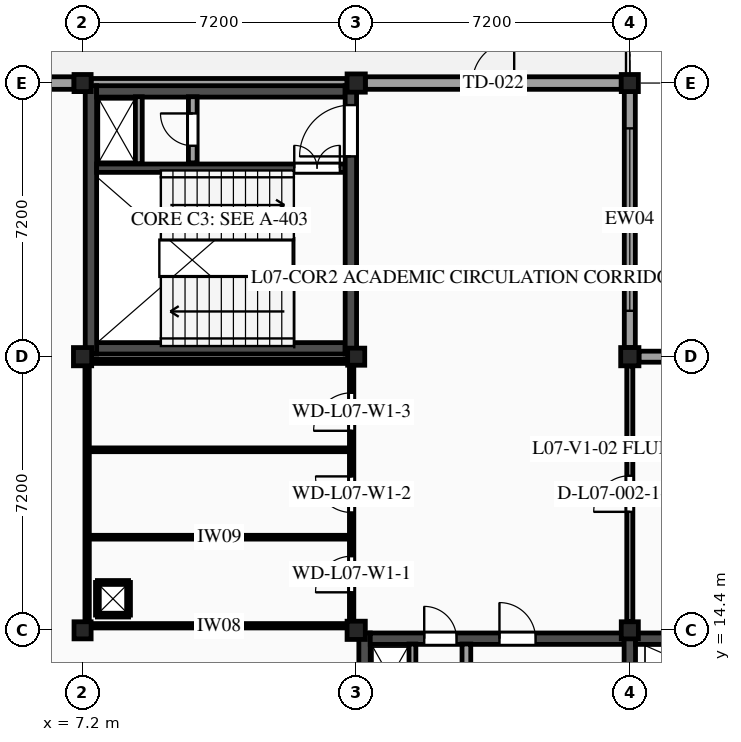
"""IFC4 building model, lengths in metres.
Left out: names, types, materials, properties, quantities, classifications, styles, units other than length and angle.
Written with IfcOpenShell. Run it as: python <this file> out.ifc"""

import sys

from ifc_helpers import new_model, si_unit, direction, frame, frame_2d, origin, origin_2d, place, context, subcontext, project, spatial, rectangle, extrude, element, fill, save


model = new_model("IFC4")
c1 = context("Model", 3, precision=1e-05, world=origin(), true_north=direction((0.0, 1.0)))
c2 = subcontext(c1, "Body", "Model", "MODEL_VIEW")
j1 = project(units=[si_unit("LENGTHUNIT", "METRE"), si_unit("PLANEANGLEUNIT", "RADIAN")], contexts=[c1])
p1 = place(None, origin())
s1 = spatial("IfcSite", under=j1, at=p1, CompositionType="ELEMENT")
p2 = place(p1, origin())
s2 = spatial("IfcBuilding", under=s1, at=p2, CompositionType="ELEMENT")
p3 = place(p2, frame((0.0, 0.0, 30.6)))
s3 = spatial("IfcBuildingStorey", under=s2, at=p3, CompositionType="ELEMENT", Elevation=30.6)
p4 = place(p3, frame((7.2, 14.4, 0.0), z_axis=(0.0, 0.0, 1.0), x_axis=(1.0, 0.0, 0.0)))
e1 = element("IfcColumn", 1, at=p4, inside=s3, PredefinedType="COLUMN", context=c2, shape_type="SweptSolid", body=[
    extrude(rectangle(XDim=0.45, YDim=0.45, at=origin_2d()), origin(), (0.0, 0.0, 1.0), 3.9),
])
p5 = place(p3, frame((7.2, 21.6, 0.0), z_axis=(0.0, 0.0, 1.0), x_axis=(1.0, 0.0, 0.0)))
e2 = element("IfcColumn", 2, at=p5, inside=s3, PredefinedType="COLUMN", context=c2, shape_type="SweptSolid", body=[
    extrude(rectangle(XDim=0.48, YDim=0.48, at=origin_2d()), origin(), (0.0, 0.0, 1.0), 3.9),
])
p6 = place(p3, frame((7.2, 28.8, 0.0), z_axis=(0.0, 0.0, 1.0), x_axis=(1.0, 0.0, 0.0)))
e3 = element("IfcColumn", 3, at=p6, inside=s3, PredefinedType="COLUMN", context=c2, shape_type="SweptSolid", body=[
    extrude(rectangle(XDim=0.45, YDim=0.45, at=origin_2d()), origin(), (0.0, 0.0, 1.0), 3.9),
])
p7 = place(p3, frame((14.4, 14.4, 0.0), z_axis=(0.0, 0.0, 1.0), x_axis=(1.0, 0.0, 0.0)))
e4 = element("IfcColumn", 4, at=p7, inside=s3, PredefinedType="COLUMN", context=c2, shape_type="SweptSolid", body=[
    extrude(rectangle(XDim=0.48, YDim=0.48, at=origin_2d()), origin(), (0.0, 0.0, 1.0), 3.9),
])
p8 = place(p3, frame((14.4, 21.6, 0.0), z_axis=(0.0, 0.0, 1.0), x_axis=(1.0, 0.0, 0.0)))
e5 = element("IfcColumn", 5, at=p8, inside=s3, PredefinedType="COLUMN", context=c2, shape_type="SweptSolid", body=[
    extrude(rectangle(XDim=0.45, YDim=0.45, at=origin_2d()), origin(), (0.0, 0.0, 1.0), 3.9),
])
p9 = place(p3, frame((14.4, 28.8, 0.0), z_axis=(0.0, 0.0, 1.0), x_axis=(1.0, 0.0, 0.0)))
e6 = element("IfcColumn", 6, at=p9, inside=s3, PredefinedType="COLUMN", context=c2, shape_type="SweptSolid", body=[
    extrude(rectangle(XDim=0.48, YDim=0.48, at=origin_2d()), origin(), (0.0, 0.0, 1.0), 3.9),
])
p10 = place(p3, frame((21.6, 14.4, 0.0), z_axis=(0.0, 0.0, 1.0), x_axis=(1.0, 0.0, 0.0)))
e7 = element("IfcColumn", 7, at=p10, inside=s3, PredefinedType="COLUMN", context=c2, shape_type="SweptSolid", body=[
    extrude(rectangle(XDim=0.45, YDim=0.45, at=origin_2d()), origin(), (0.0, 0.0, 1.0), 3.9),
])
p11 = place(p3, frame((21.6, 21.6, 0.0), z_axis=(0.0, 0.0, 1.0), x_axis=(1.0, 0.0, 0.0)))
e8 = element("IfcColumn", 8, at=p11, inside=s3, PredefinedType="COLUMN", context=c2, shape_type="SweptSolid", body=[
    extrude(rectangle(XDim=0.48, YDim=0.48, at=origin_2d()), origin(), (0.0, 0.0, 1.0), 3.9),
])
p12 = place(p3, frame((21.6, 28.8, 0.0), z_axis=(0.0, 0.0, 1.0), x_axis=(1.0, 0.0, 0.0)))
e9 = element("IfcColumn", 9, at=p12, inside=s3, PredefinedType="COLUMN", context=c2, shape_type="SweptSolid", body=[
    extrude(rectangle(XDim=0.45, YDim=0.45, at=origin_2d()), origin(), (0.0, 0.0, 1.0), 3.9),
])
p13 = place(p3, frame((0.24, 28.8, 0.0), z_axis=(0.0, 0.0, 1.0), x_axis=(1.0, 0.0, 0.0)))
e10 = element("IfcWall", 10, at=p13, inside=s3, PredefinedType="STANDARD", context=c2, shape_type="SweptSolid", body=[
    extrude(rectangle(XDim=6.735, YDim=0.33, at=frame_2d((3.368, 0.0))), origin(), (0.0, 0.0, 1.0), 2.88),
])
p14 = place(p13, frame((2.667, 0.0, 0.0)))
e11 = element("IfcOpeningElement", 11, at=p14, cuts=e10, PredefinedType="OPENING", context=c2, shape_type="SweptSolid", body=[
    extrude(rectangle(XDim=1.4, YDim=2.25, at=frame_2d((0.7, 1.125))), frame((0.0, 0.175, 0.0), z_axis=(0.0, -1.0, 0.0), x_axis=(1.0, 0.0, 0.0)), (0.0, 0.0, 1.0), 0.35),
])
p15 = place(p3, frame((7.425, 28.8, 0.0), z_axis=(0.0, 0.0, 1.0), x_axis=(1.0, 0.0, 0.0)))
e12 = element("IfcWall", 12, at=p15, inside=s3, PredefinedType="STANDARD", context=c2, shape_type="SweptSolid", body=[
    extrude(rectangle(XDim=6.735, YDim=0.24, at=frame_2d((3.367, 0.0))), origin(), (0.0, 0.0, 1.0), 2.88),
])
p16 = place(p3, frame((14.64, 28.8, 0.0), z_axis=(0.0, 0.0, 1.0), x_axis=(1.0, 0.0, 0.0)))
e13 = element("IfcWall", 13, at=p16, inside=s3, PredefinedType="STANDARD", context=c2, shape_type="SweptSolid", body=[
    extrude(rectangle(XDim=6.735, YDim=0.33, at=frame_2d((3.368, 0.0))), origin(), (0.0, 0.0, 1.0), 2.88),
])
p17 = place(p16, frame((2.817, 0.0, 0.0)))
e14 = element("IfcOpeningElement", 14, at=p17, cuts=e13, PredefinedType="OPENING", context=c2, shape_type="SweptSolid", body=[
    extrude(rectangle(XDim=1.1, YDim=2.2, at=frame_2d((0.55, 1.1))), frame((0.0, 0.175, 0.0), z_axis=(0.0, -1.0, 0.0), x_axis=(1.0, 0.0, 0.0)), (0.0, 0.0, 1.0), 0.35),
])
p18 = place(p3, frame((21.6, 28.575, 0.0), z_axis=(0.0, 0.0, 1.0), x_axis=(0.0, -1.0, 0.0)))
e15 = element("IfcWall", 15, at=p18, inside=s3, PredefinedType="STANDARD", context=c2, shape_type="SweptSolid", body=[
    extrude(rectangle(XDim=6.735, YDim=0.29, at=frame_2d((3.367, 0.0))), origin(), (0.0, 0.0, 1.0), 2.88),
])
p19 = place(p18, frame((0.968, 0.0, 0.98)))
e16 = element("IfcOpeningElement", 16, at=p19, cuts=e15, PredefinedType="OPENING", context=c2, shape_type="SweptSolid", body=[
    extrude(rectangle(XDim=4.8, YDim=1.5, at=frame_2d((2.4, 0.75))), frame((0.0, 0.155, 0.0), z_axis=(0.0, -1.0, 0.0), x_axis=(1.0, 0.0, 0.0)), (0.0, 0.0, 1.0), 0.31),
])
p20 = place(p3, frame((21.84, 21.6, 0.0), z_axis=(0.0, 0.0, 1.0), x_axis=(1.0, 0.0, 0.0)))
e17 = element("IfcWall", 17, at=p20, inside=s3, PredefinedType="STANDARD", context=c2, shape_type="SweptSolid", body=[
    extrude(rectangle(XDim=6.735, YDim=0.29, at=frame_2d((3.367, 0.0))), origin(), (0.0, 0.0, 1.0), 2.88),
])
p21 = place(p20, frame((1.268, 0.0, 0.98)))
e18 = element("IfcOpeningElement", 18, at=p21, cuts=e17, PredefinedType="OPENING", context=c2, shape_type="SweptSolid", body=[
    extrude(rectangle(XDim=4.2, YDim=1.5, at=frame_2d((2.1, 0.75))), frame((0.0, 0.155, 0.0), z_axis=(0.0, -1.0, 0.0), x_axis=(1.0, 0.0, 0.0)), (0.0, 0.0, 1.0), 0.31),
])
p22 = place(p3, frame((14.62, 14.33, 0.0), z_axis=(0.0, 0.0, 1.0), x_axis=(0.0, -1.0, 0.0)))
e19 = element("IfcWall", 19, at=p22, inside=s3, PredefinedType="SHEAR", context=c2, shape_type="SweptSolid", body=[
    extrude(rectangle(XDim=7.06, YDim=0.3, at=frame_2d((3.53, 0.0))), origin(), (0.0, 0.0, 1.0), 3.685),
])
p23 = place(p3, frame((14.77, 14.18, 0.0), z_axis=(0.0, 0.0, 1.0), x_axis=(1.0, 0.0, 0.0)))
e20 = element("IfcWall", 20, at=p23, inside=s3, PredefinedType="SHEAR", context=c2, shape_type="SweptSolid", body=[
    extrude(rectangle(XDim=6.68, YDim=0.3, at=frame_2d((3.34, 0.0))), origin(), (0.0, 0.0, 1.0), 3.685),
])
p24 = place(p23, frame((1.42, 0.0, 0.0)))
e21 = element("IfcOpeningElement", 21, at=p24, cuts=e20, PredefinedType="OPENING", context=c2, shape_type="SweptSolid", body=[
    extrude(rectangle(XDim=0.85, YDim=2.1, at=frame_2d((0.425, 1.05))), frame((0.0, 0.16, 0.0), z_axis=(0.0, -1.0, 0.0), x_axis=(1.0, 0.0, 0.0)), (0.0, 0.0, 1.0), 0.32),
])
p25 = place(p23, frame((3.4, 0.0, 0.0)))
e22 = element("IfcOpeningElement", 22, at=p25, cuts=e20, PredefinedType="OPENING", context=c2, shape_type="SweptSolid", body=[
    extrude(rectangle(XDim=0.95, YDim=2.15, at=frame_2d((0.475, 1.075))), frame((0.0, 0.16, 0.0), z_axis=(0.0, -1.0, 0.0), x_axis=(1.0, 0.0, 0.0)), (0.0, 0.0, 1.0), 0.32),
])
p26 = place(p3, frame((17.3, 12.3, 0.0), z_axis=(0.0, 0.0, 1.0), x_axis=(0.0, 1.0, 0.0)))
e23 = element("IfcWall", 23, at=p26, inside=s3, PredefinedType="PARTITIONING", context=c2, shape_type="SweptSolid", body=[
    extrude(rectangle(XDim=1.74, YDim=0.23, at=frame_2d((0.87, 0.0))), origin(), (0.0, 0.0, 1.0), 3.685),
])
p27 = place(p3, frame((15.88, 12.28, 0.0), z_axis=(0.0, 0.0, 1.0), x_axis=(0.0, 1.0, 0.0)))
e24 = element("IfcWall", 24, at=p27, inside=s3, PredefinedType="PARTITIONING", context=c2, shape_type="SweptSolid", body=[
    extrude(rectangle(XDim=1.76, YDim=0.18, at=frame_2d((0.88, 0.0))), origin(), (0.0, 0.0, 1.0), 3.685),
])
p28 = place(p3, frame((21.6, 7.27, 0.0), z_axis=(0.0, 0.0, 1.0), x_axis=(0.0, 1.0, 0.0)))
e25 = element("IfcWall", 25, at=p28, inside=s3, PredefinedType="SHEAR", context=c2, shape_type="SweptSolid", body=[
    extrude(rectangle(XDim=7.06, YDim=0.3, at=frame_2d((3.53, 0.0))), origin(), (0.0, 0.0, 1.0), 3.685),
])
p29 = place(p28, frame((1.4, 0.0, 0.0)))
e26 = element("IfcOpeningElement", 26, at=p29, cuts=e25, PredefinedType="OPENING", context=c2, shape_type="SweptSolid", body=[
    extrude(rectangle(XDim=1.8, YDim=2.2, at=frame_2d((0.9, 1.1))), frame((0.0, 0.16, 0.0), z_axis=(0.0, -1.0, 0.0), x_axis=(1.0, 0.0, 0.0)), (0.0, 0.0, 1.0), 0.32),
])
p30 = place(p3, frame((21.75, 14.18, 0.0), z_axis=(0.0, 0.0, 1.0), x_axis=(1.0, 0.0, 0.0)))
e27 = element("IfcWall", 27, at=p30, inside=s3, PredefinedType="SHEAR", context=c2, shape_type="SweptSolid", body=[
    extrude(rectangle(XDim=6.68, YDim=0.3, at=frame_2d((3.34, 0.0))), origin(), (0.0, 0.0, 1.0), 3.685),
])
p31 = place(p3, frame((7.57, 21.82, 0.0), z_axis=(0.0, 0.0, 1.0), x_axis=(1.0, 0.0, 0.0)))
e28 = element("IfcWall", 28, at=p31, inside=s3, PredefinedType="SHEAR", context=c2, shape_type="SweptSolid", body=[
    extrude(rectangle(XDim=6.54, YDim=0.3, at=frame_2d((3.27, 0.0))), origin(), (0.0, 0.0, 1.0), 3.685),
])
p32 = place(p3, frame((7.42, 28.73, 0.0), z_axis=(0.0, 0.0, 1.0), x_axis=(0.0, -1.0, 0.0)))
e29 = element("IfcWall", 29, at=p32, inside=s3, PredefinedType="SHEAR", context=c2, shape_type="SweptSolid", body=[
    extrude(rectangle(XDim=7.06, YDim=0.3, at=frame_2d((3.53, 0.0))), origin(), (0.0, 0.0, 1.0), 3.685),
])
p33 = place(p3, frame((7.57, 28.58, 0.0), z_axis=(0.0, 0.0, 1.0), x_axis=(1.0, 0.0, 0.0)))
e30 = element("IfcWall", 30, at=p33, inside=s3, PredefinedType="SHEAR", context=c2, shape_type="SweptSolid", body=[
    extrude(rectangle(XDim=6.54, YDim=0.3, at=frame_2d((3.27, 0.0))), origin(), (0.0, 0.0, 1.0), 3.685),
])
p34 = place(p3, frame((7.57, 26.56, 0.0), z_axis=(0.0, 0.0, 1.0), x_axis=(1.0, 0.0, 0.0)))
e31 = element("IfcWall", 31, at=p34, inside=s3, PredefinedType="SHEAR", context=c2, shape_type="SweptSolid", body=[
    extrude(rectangle(XDim=6.54, YDim=0.22, at=frame_2d((3.27, 0.0))), origin(), (0.0, 0.0, 1.0), 3.685),
])
p35 = place(p34, frame((5.2, 0.0, 0.0)))
e32 = element("IfcOpeningElement", 32, at=p35, cuts=e31, PredefinedType="OPENING", context=c2, shape_type="SweptSolid", body=[
    extrude(rectangle(XDim=1.2, YDim=2.2, at=frame_2d((0.6, 1.1))), frame((0.0, 0.12, 0.0), z_axis=(0.0, -1.0, 0.0), x_axis=(1.0, 0.0, 0.0)), (0.0, 0.0, 1.0), 0.24),
])
p36 = place(p3, frame((10.1, 26.7, 0.0), z_axis=(0.0, 0.0, 1.0), x_axis=(0.0, 1.0, 0.0)))
e33 = element("IfcWall", 33, at=p36, inside=s3, PredefinedType="PARTITIONING", context=c2, shape_type="SweptSolid", body=[
    extrude(rectangle(XDim=1.74, YDim=0.23, at=frame_2d((0.87, 0.0))), origin(), (0.0, 0.0, 1.0), 3.685),
])
p37 = place(p36, frame((0.45, 0.0, 0.0)))
e34 = element("IfcOpeningElement", 34, at=p37, cuts=e33, PredefinedType="OPENING", context=c2, shape_type="SweptSolid", body=[
    extrude(rectangle(XDim=0.85, YDim=2.1, at=frame_2d((0.425, 1.05))), frame((0.0, 0.125, 0.0), z_axis=(0.0, -1.0, 0.0), x_axis=(1.0, 0.0, 0.0)), (0.0, 0.0, 1.0), 0.25),
])
p38 = place(p3, frame((8.68, 26.68, 0.0), z_axis=(0.0, 0.0, 1.0), x_axis=(0.0, 1.0, 0.0)))
e35 = element("IfcWall", 35, at=p38, inside=s3, PredefinedType="PARTITIONING", context=c2, shape_type="SweptSolid", body=[
    extrude(rectangle(XDim=1.76, YDim=0.18, at=frame_2d((0.88, 0.0))), origin(), (0.0, 0.0, 1.0), 3.685),
])
p39 = place(p3, frame((14.26, 21.67, 0.0), z_axis=(0.0, 0.0, 1.0), x_axis=(0.0, 1.0, 0.0)))
e36 = element("IfcWall", 36, at=p39, inside=s3, PredefinedType="SHEAR", context=c2, shape_type="SweptSolid", body=[
    extrude(rectangle(XDim=7.06, YDim=0.3, at=frame_2d((3.53, 0.0))), origin(), (0.0, 0.0, 1.0), 3.685),
])
p40 = place(p39, frame((5.2, 0.0, 0.0)))
e37 = element("IfcOpeningElement", 37, at=p40, cuts=e36, PredefinedType="OPENING", context=c2, shape_type="SweptSolid", body=[
    extrude(rectangle(XDim=1.35, YDim=2.15, at=frame_2d((0.675, 1.075))), frame((0.0, 0.16, 0.0), z_axis=(0.0, -1.0, 0.0), x_axis=(1.0, 0.0, 0.0)), (0.0, 0.0, 1.0), 0.32),
])
p41 = place(p3, frame((7.43, 14.52, 0.0), z_axis=(0.0, 0.0, 1.0), x_axis=(1.0, 0.0, 0.0)))
e38 = element("IfcWall", 38, at=p41, inside=s3, PredefinedType="PARTITIONING", context=c2, shape_type="SweptSolid", body=[
    extrude(rectangle(XDim=6.725, YDim=0.115, at=frame_2d((3.363, 0.0))), origin(), (0.0, 0.0, 1.0), 3.045),
])
p42 = place(p3, frame((7.445, 21.48, 0.0), z_axis=(0.0, 0.0, 1.0), x_axis=(1.0, 0.0, 0.0)))
e39 = element("IfcWall", 39, at=p42, inside=s3, PredefinedType="PARTITIONING", context=c2, shape_type="SweptSolid", body=[
    extrude(rectangle(XDim=6.725, YDim=0.115, at=frame_2d((3.362, 0.0))), origin(), (0.0, 0.0, 1.0), 3.045),
])
p43 = place(p3, frame((7.32, 14.63, 0.0), z_axis=(0.0, 0.0, 1.0), x_axis=(0.0, 1.0, 0.0)))
e40 = element("IfcWall", 40, at=p43, inside=s3, PredefinedType="PARTITIONING", context=c2, shape_type="SweptSolid", body=[
    extrude(rectangle(XDim=6.725, YDim=0.115, at=frame_2d((3.363, 0.0))), origin(), (0.0, 0.0, 1.0), 3.0),
])
p44 = place(p3, frame((14.28, 14.645, 0.0), z_axis=(0.0, 0.0, 1.0), x_axis=(0.0, 1.0, 0.0)))
e41 = element("IfcWall", 41, at=p44, inside=s3, PredefinedType="PARTITIONING", context=c2, shape_type="SweptSolid", body=[
    extrude(rectangle(XDim=6.725, YDim=0.115, at=frame_2d((3.363, 0.0))), origin(), (0.0, 0.0, 1.0), 3.0),
])
p45 = place(p44, frame((0.755, 0.0, 0.0)))
e42 = element("IfcOpeningElement", 42, at=p45, cuts=e41, PredefinedType="OPENING", context=c2, shape_type="SweptSolid", body=[
    extrude(rectangle(XDim=0.95, YDim=2.1, at=frame_2d((0.475, 1.05))), frame((0.0, 0.067, 0.0), z_axis=(0.0, -1.0, 0.0), x_axis=(1.0, 0.0, 0.0)), (0.0, 0.0, 1.0), 0.135),
])
p46 = place(p44, frame((2.855, 0.0, 0.0)))
e43 = element("IfcOpeningElement", 43, at=p46, cuts=e41, PredefinedType="OPENING", context=c2, shape_type="SweptSolid", body=[
    extrude(rectangle(XDim=0.95, YDim=2.1, at=frame_2d((0.475, 1.05))), frame((0.0, 0.067, 0.0), z_axis=(0.0, -1.0, 0.0), x_axis=(1.0, 0.0, 0.0)), (0.0, 0.0, 1.0), 0.135),
])
p47 = place(p44, frame((5.005, 0.0, 0.0)))
e44 = element("IfcOpeningElement", 44, at=p47, cuts=e41, PredefinedType="OPENING", context=c2, shape_type="SweptSolid", body=[
    extrude(rectangle(XDim=1.0, YDim=2.15, at=frame_2d((0.5, 1.075))), frame((0.0, 0.067, 0.0), z_axis=(0.0, -1.0, 0.0), x_axis=(1.0, 0.0, 0.0)), (0.0, 0.0, 1.0), 0.135),
])
for number, where, z_axis, x_axis in (
    (45, (7.4, 16.85, 0.0), (0.0, 0.0, 1.0), (1.0, 0.0, 0.0)),
    (46, (7.4, 19.15, 0.0), (0.0, 0.0, 1.0), (1.0, 0.0, 0.0)),
):
    element("IfcWall", number, at=place(p3, frame(where, z_axis=z_axis, x_axis=x_axis)), inside=s3, PredefinedType="PARTITIONING", context=c2, shape_type="SweptSolid", body=[
        extrude(rectangle(XDim=6.8, YDim=0.1, at=frame_2d((3.4, 0.0))), origin(), (0.0, 0.0, 1.0), 3.685),
    ])
p48 = place(p3, frame((7.59, 14.8, 0.0), z_axis=(0.0, 0.0, 1.0), x_axis=(1.0, 0.0, 0.0)))
e47 = element("IfcWall", 47, at=p48, inside=s3, PredefinedType="PARTITIONING", context=c2, shape_type="SweptSolid", body=[
    extrude(rectangle(XDim=0.82, YDim=0.1, at=frame_2d((0.41, 0.0))), origin(), (0.0, 0.0, 1.0), 3.685),
])
p49 = place(p3, frame((8.41, 14.8, 0.0), z_axis=(0.0, 0.0, 1.0), x_axis=(0.0, 1.0, 0.0)))
e48 = element("IfcWall", 48, at=p49, inside=s3, PredefinedType="PARTITIONING", context=c2, shape_type="SweptSolid", body=[
    extrude(rectangle(XDim=0.86, YDim=0.1, at=frame_2d((0.43, 0.0))), origin(), (0.0, 0.0, 1.0), 3.685),
])
p50 = place(p3, frame((8.41, 15.66, 0.0), z_axis=(0.0, 0.0, 1.0), x_axis=(-1.0, 0.0, 0.0)))
e49 = element("IfcWall", 49, at=p50, inside=s3, PredefinedType="PARTITIONING", context=c2, shape_type="SweptSolid", body=[
    extrude(rectangle(XDim=0.82, YDim=0.1, at=frame_2d((0.41, 0.0))), origin(), (0.0, 0.0, 1.0), 3.685),
])
p51 = place(p3, frame((7.59, 15.66, 0.0), z_axis=(0.0, 0.0, 1.0), x_axis=(0.0, -1.0, 0.0)))
e50 = element("IfcWall", 50, at=p51, inside=s3, PredefinedType="PARTITIONING", context=c2, shape_type="SweptSolid", body=[
    extrude(rectangle(XDim=0.86, YDim=0.1, at=frame_2d((0.43, 0.0))), origin(), (0.0, 0.0, 1.0), 3.685),
])
p52 = place(p3, frame((21.6, 14.63, 0.0), z_axis=(0.0, 0.0, 1.0), x_axis=(0.0, 1.0, 0.0)))
e51 = element("IfcWall", 51, at=p52, inside=s3, PredefinedType="PARTITIONING", context=c2, shape_type="SweptSolid", body=[
    extrude(rectangle(XDim=6.725, YDim=0.16, at=frame_2d((3.363, 0.0))), origin(), (0.0, 0.0, 1.0), 3.0),
])
p53 = place(p52, frame((2.887, 0.0, 0.0)))
e52 = element("IfcOpeningElement", 52, at=p53, cuts=e51, PredefinedType="OPENING", context=c2, shape_type="SweptSolid", body=[
    extrude(rectangle(XDim=0.95, YDim=2.15, at=frame_2d((0.475, 1.075))), frame((0.0, 0.09, 0.0), z_axis=(0.0, -1.0, 0.0), x_axis=(1.0, 0.0, 0.0)), (0.0, 0.0, 1.0), 0.18),
])
p54 = place(p17, origin())
e53 = element("IfcDoor", 53, at=p54, inside=s3, OperationType="SINGLE_SWING_RIGHT", PredefinedType="DOOR", context=c2, shape_type="SweptSolid", body=[
    extrude(rectangle(XDim=1.1, YDim=2.2, at=frame_2d((0.55, 1.1))), frame((0.0, 0.025, 0.0), z_axis=(0.0, -1.0, 0.0), x_axis=(1.0, 0.0, 0.0)), (0.0, 0.0, 1.0), 0.05),
])
fill(e14, e53)
p55 = place(p19, origin())
e54 = element("IfcWindow", 54, at=p55, inside=s3, PartitioningType="SINGLE_PANEL", PredefinedType="WINDOW", context=c2, shape_type="SweptSolid", body=[
    extrude(rectangle(XDim=4.8, YDim=1.5, at=frame_2d((2.4, 0.75))), frame((0.0, -0.03, 0.0), z_axis=(0.0, -1.0, 0.0), x_axis=(1.0, 0.0, 0.0)), (0.0, 0.0, 1.0), 0.06),
])
fill(e16, e54)
p56 = place(p24, origin())
e55 = element("IfcDoor", 55, at=p56, inside=s3, OperationType="SINGLE_SWING_LEFT", PredefinedType="DOOR", context=c2, shape_type="SweptSolid", body=[
    extrude(rectangle(XDim=0.85, YDim=2.1, at=frame_2d((0.425, 1.05))), frame((0.0, 0.025, 0.0), z_axis=(0.0, -1.0, 0.0), x_axis=(1.0, 0.0, 0.0)), (0.0, 0.0, 1.0), 0.05),
])
fill(e21, e55)
p57 = place(p25, origin())
e56 = element("IfcDoor", 56, at=p57, inside=s3, OperationType="SINGLE_SWING_LEFT", PredefinedType="DOOR", context=c2, shape_type="SweptSolid", body=[
    extrude(rectangle(XDim=0.95, YDim=2.15, at=frame_2d((0.475, 1.075))), frame((0.0, 0.025, 0.0), z_axis=(0.0, -1.0, 0.0), x_axis=(1.0, 0.0, 0.0)), (0.0, 0.0, 1.0), 0.05),
])
fill(e22, e56)
p58 = place(p37, origin())
e57 = element("IfcDoor", 57, at=p58, inside=s3, OperationType="SINGLE_SWING_RIGHT", PredefinedType="DOOR", context=c2, shape_type="SweptSolid", body=[
    extrude(rectangle(XDim=0.85, YDim=2.1, at=frame_2d((0.425, 1.05))), frame((0.0, 0.025, 0.0), z_axis=(0.0, -1.0, 0.0), x_axis=(1.0, 0.0, 0.0)), (0.0, 0.0, 1.0), 0.05),
])
fill(e34, e57)
p59 = place(p35, origin())
e58 = element("IfcDoor", 58, at=p59, inside=s3, OperationType="DOUBLE_DOOR_SINGLE_SWING", PredefinedType="DOOR", context=c2, shape_type="SweptSolid", body=[
    extrude(rectangle(XDim=1.2, YDim=2.2, at=frame_2d((0.6, 1.1))), frame((0.0, 0.025, 0.0), z_axis=(0.0, -1.0, 0.0), x_axis=(1.0, 0.0, 0.0)), (0.0, 0.0, 1.0), 0.05),
])
fill(e32, e58)
p60 = place(p40, origin())
e59 = element("IfcDoor", 59, at=p60, inside=s3, OperationType="SINGLE_SWING_LEFT", PredefinedType="DOOR", context=c2, shape_type="SweptSolid", body=[
    extrude(rectangle(XDim=1.35, YDim=2.15, at=frame_2d((0.675, 1.075))), frame((0.0, 0.025, 0.0), z_axis=(0.0, -1.0, 0.0), x_axis=(1.0, 0.0, 0.0)), (0.0, 0.0, 1.0), 0.05),
])
fill(e37, e59)
p61 = place(p45, origin())
e60 = element("IfcDoor", 60, at=p61, inside=s3, OperationType="SINGLE_SWING_LEFT", PredefinedType="DOOR", context=c2, shape_type="SweptSolid", body=[
    extrude(rectangle(XDim=0.95, YDim=2.1, at=frame_2d((0.475, 1.05))), frame((0.0, 0.025, 0.0), z_axis=(0.0, -1.0, 0.0), x_axis=(1.0, 0.0, 0.0)), (0.0, 0.0, 1.0), 0.05),
])
fill(e42, e60)
p62 = place(p46, origin())
e61 = element("IfcDoor", 61, at=p62, inside=s3, OperationType="SINGLE_SWING_RIGHT", PredefinedType="DOOR", context=c2, shape_type="SweptSolid", body=[
    extrude(rectangle(XDim=0.95, YDim=2.1, at=frame_2d((0.475, 1.05))), frame((0.0, 0.025, 0.0), z_axis=(0.0, -1.0, 0.0), x_axis=(1.0, 0.0, 0.0)), (0.0, 0.0, 1.0), 0.05),
])
fill(e43, e61)
p63 = place(p47, origin())
e62 = element("IfcDoor", 62, at=p63, inside=s3, OperationType="SINGLE_SWING_LEFT", PredefinedType="DOOR", context=c2, shape_type="SweptSolid", body=[
    extrude(rectangle(XDim=1.0, YDim=2.15, at=frame_2d((0.5, 1.075))), frame((0.0, 0.025, 0.0), z_axis=(0.0, -1.0, 0.0), x_axis=(1.0, 0.0, 0.0)), (0.0, 0.0, 1.0), 0.05),
])
fill(e44, e62)
p64 = place(p53, origin())
e63 = element("IfcDoor", 63, at=p64, inside=s3, OperationType="SINGLE_SWING_LEFT", PredefinedType="DOOR", context=c2, shape_type="SweptSolid", body=[
    extrude(rectangle(XDim=0.95, YDim=2.15, at=frame_2d((0.475, 1.075))), frame((0.0, 0.025, 0.0), z_axis=(0.0, -1.0, 0.0), x_axis=(1.0, 0.0, 0.0)), (0.0, 0.0, 1.0), 0.05),
])
fill(e52, e63)
save(model, sys.argv[1])
